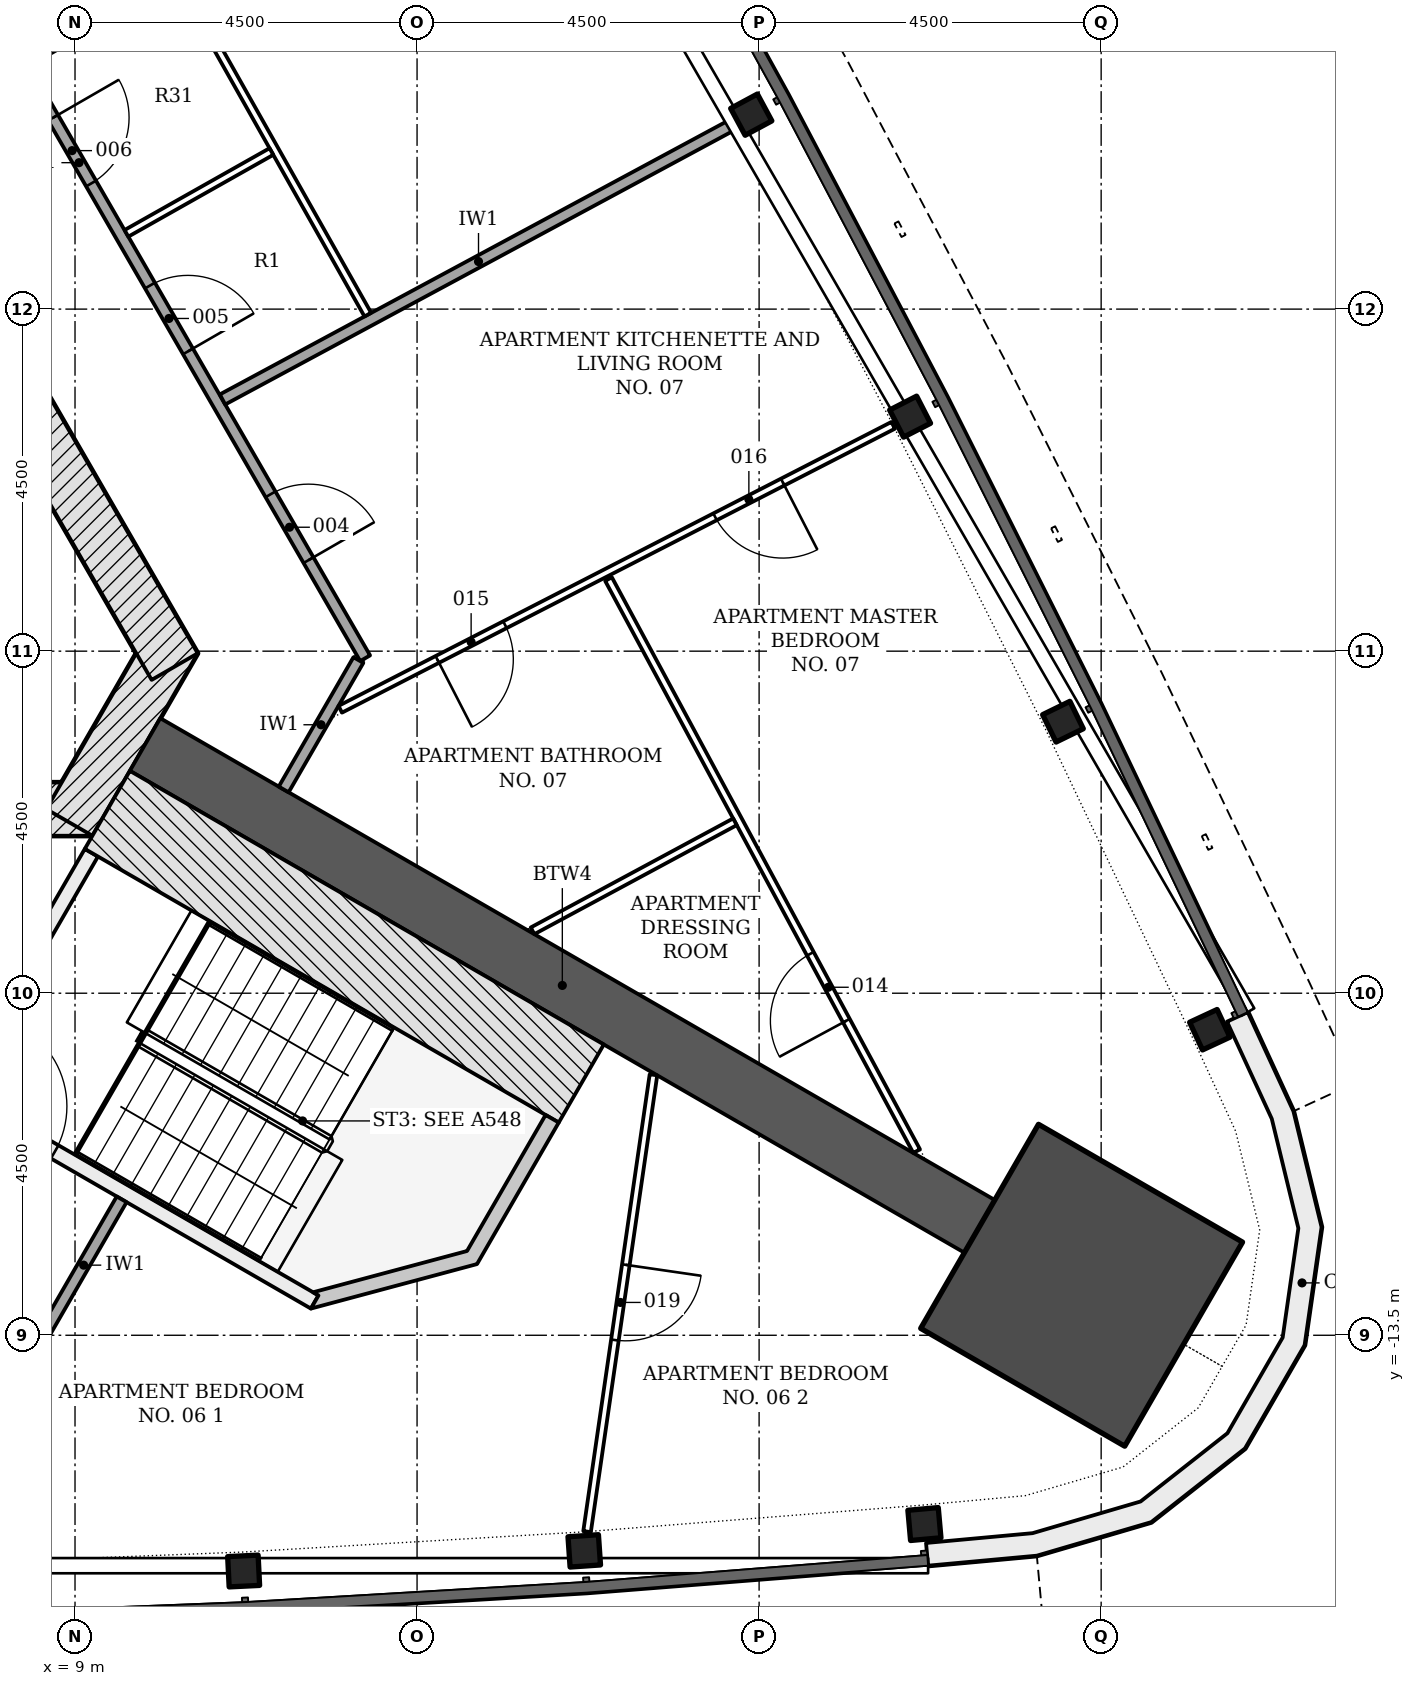
"""IFC4 building model, lengths in metres.
Left out: names, types, materials, properties, quantities, classifications, styles, units other than length and angle.
Written with IfcOpenShell. Run it as: python <this file> out.ifc"""

import sys

from ifc_helpers import new_model, si_unit, direction, frame, frame_2d, origin, origin_2d, place, context, subcontext, project, spatial, polyline, rectangle, i_section, outline, extrude, element, fill, save


model = new_model("IFC4")
c1 = context("Model", 3, precision=1e-05, world=origin(), true_north=direction((0.0, 1.0)))
c2 = subcontext(c1, "Body", "Model", "MODEL_VIEW")
j1 = project(units=[si_unit("LENGTHUNIT", "METRE"), si_unit("PLANEANGLEUNIT", "RADIAN")], contexts=[c1])
p1 = place(None, origin())
s1 = spatial("IfcSite", under=j1, at=p1, CompositionType="ELEMENT")
p2 = place(p1, origin())
s2 = spatial("IfcBuilding", under=s1, at=p2, CompositionType="ELEMENT")
p3 = place(p2, frame((0.0, 0.0, 91.5)))
s3 = spatial("IfcBuildingStorey", under=s2, at=p3, CompositionType="ELEMENT", Elevation=91.5)
p4 = place(p3, frame((-9.229, -6.578, -0.2), z_axis=(0.0, 0.0, 1.0), x_axis=(1.0, 0.0, 0.0)))
e1 = element("IfcWall", 1, at=p4, inside=s3, PredefinedType="SHEAR", context=c2, shape_type="SweptSolid", body=[
    extrude(rectangle(XDim=18.458, YDim=0.7, at=frame_2d((9.229, 0.0))), origin(), (0.0, 0.0, 1.0), 3.6),
])
p5 = place(p4, frame((3.304, 0.0, 0.2)))
e2 = element("IfcOpeningElement", 2, at=p5, cuts=e1, PredefinedType="OPENING", context=c2, shape_type="SweptSolid", body=[
    extrude(rectangle(XDim=1.1, YDim=2.1, at=frame_2d((0.55, 1.05))), frame((0.0, 0.36, 0.0), z_axis=(0.0, -1.0, 0.0), x_axis=(1.0, 0.0, 0.0)), (0.0, 0.0, 1.0), 0.72),
])
p6 = place(p4, frame((5.454, 0.0, 0.2)))
e3 = element("IfcOpeningElement", 3, at=p6, cuts=e1, PredefinedType="OPENING", context=c2, shape_type="SweptSolid", body=[
    extrude(rectangle(XDim=1.1, YDim=2.1, at=frame_2d((0.55, 1.05))), frame((0.0, 0.36, 0.0), z_axis=(0.0, -1.0, 0.0), x_axis=(1.0, 0.0, 0.0)), (0.0, 0.0, 1.0), 0.72),
])
p7 = place(p4, frame((7.604, 0.0, 0.2)))
e4 = element("IfcOpeningElement", 4, at=p7, cuts=e1, PredefinedType="OPENING", context=c2, shape_type="SweptSolid", body=[
    extrude(rectangle(XDim=1.1, YDim=2.1, at=frame_2d((0.55, 1.05))), frame((0.0, 0.36, 0.0), z_axis=(0.0, -1.0, 0.0), x_axis=(1.0, 0.0, 0.0)), (0.0, 0.0, 1.0), 0.72),
])
p8 = place(p4, frame((9.754, 0.0, 0.2)))
e5 = element("IfcOpeningElement", 5, at=p8, cuts=e1, PredefinedType="OPENING", context=c2, shape_type="SweptSolid", body=[
    extrude(rectangle(XDim=1.1, YDim=2.1, at=frame_2d((0.55, 1.05))), frame((0.0, 0.36, 0.0), z_axis=(0.0, -1.0, 0.0), x_axis=(1.0, 0.0, 0.0)), (0.0, 0.0, 1.0), 0.72),
])
p9 = place(p4, frame((11.904, 0.0, 0.2)))
e6 = element("IfcOpeningElement", 6, at=p9, cuts=e1, PredefinedType="OPENING", context=c2, shape_type="SweptSolid", body=[
    extrude(rectangle(XDim=1.1, YDim=2.1, at=frame_2d((0.55, 1.05))), frame((0.0, 0.36, 0.0), z_axis=(0.0, -1.0, 0.0), x_axis=(1.0, 0.0, 0.0)), (0.0, 0.0, 1.0), 0.72),
])
p10 = place(p4, frame((14.054, 0.0, 0.2)))
e7 = element("IfcOpeningElement", 7, at=p10, cuts=e1, PredefinedType="OPENING", context=c2, shape_type="SweptSolid", body=[
    extrude(rectangle(XDim=1.1, YDim=2.1, at=frame_2d((0.55, 1.05))), frame((0.0, 0.36, 0.0), z_axis=(0.0, -1.0, 0.0), x_axis=(1.0, 0.0, 0.0)), (0.0, 0.0, 1.0), 0.72),
])
p11 = place(p4, frame((1.079, 0.0, 0.2)))
e8 = element("IfcOpeningElement", 8, at=p11, cuts=e1, PredefinedType="OPENING", context=c2, shape_type="SweptSolid", body=[
    extrude(rectangle(XDim=0.9, YDim=2.1, at=frame_2d((0.45, 1.05))), frame((0.0, 0.36, 0.0), z_axis=(0.0, -1.0, 0.0), x_axis=(1.0, 0.0, 0.0)), (0.0, 0.0, 1.0), 0.72),
])
p12 = place(p3, frame((8.926, -6.753, -0.2), z_axis=(0.0, 0.0, 1.0), x_axis=(0.500042739161, 0.866000726912, 0.0)))
e9 = element("IfcWall", 9, at=p12, inside=s3, PredefinedType="SHEAR", context=c2, shape_type="SweptSolid", body=[
    extrude(rectangle(XDim=2.771, YDim=0.7, at=frame_2d((1.386, 0.0))), origin(), (0.0, 0.0, 1.0), 3.6),
])
p13 = place(p3, frame((10.311, -4.703, -0.2), z_axis=(0.0, 0.0, 1.0), x_axis=(-0.500001446645, 0.866024568562, 0.0)))
e10 = element("IfcWall", 10, at=p13, inside=s3, PredefinedType="SHEAR", context=c2, shape_type="SweptSolid", body=[
    extrude(rectangle(XDim=18.458, YDim=0.7, at=frame_2d((9.229, 0.0))), origin(), (0.0, 0.0, 1.0), 3.6),
])
p14 = place(p13, frame((8.7, 0.0, 0.2)))
e11 = element("IfcOpeningElement", 11, at=p14, cuts=e10, PredefinedType="OPENING", context=c2, shape_type="SweptSolid", body=[
    extrude(rectangle(XDim=1.0, YDim=2.1, at=frame_2d((0.5, 1.05))), frame((0.0, 0.36, 0.0), z_axis=(0.0, -1.0, 0.0), x_axis=(1.0, 0.0, 0.0)), (0.0, 0.0, 1.0), 0.72),
])
p15 = place(p13, frame((3.99, 0.0, 0.2)))
e12 = element("IfcOpeningElement", 12, at=p15, cuts=e10, PredefinedType="OPENING", context=c2, shape_type="SweptSolid", body=[
    extrude(rectangle(XDim=0.9, YDim=2.1, at=frame_2d((0.45, 1.05))), frame((0.0, 0.36, 0.0), z_axis=(0.0, -1.0, 0.0), x_axis=(1.0, 0.0, 0.0)), (0.0, 0.0, 1.0), 0.72),
])
p16 = place(p13, frame((13.539, 0.0, 0.2)))
e13 = element("IfcOpeningElement", 13, at=p16, cuts=e10, PredefinedType="OPENING", context=c2, shape_type="SweptSolid", body=[
    extrude(rectangle(XDim=0.9, YDim=2.1, at=frame_2d((0.45, 1.05))), frame((0.0, 0.36, 0.0), z_axis=(0.0, -1.0, 0.0), x_axis=(1.0, 0.0, 0.0)), (0.0, 0.0, 1.0), 0.72),
])
p17 = place(p3, frame((9.922, -5.728, -0.2), z_axis=(0.0, 0.0, 1.0), x_axis=(0.866029086277, -0.499993621681, 0.0)))
e14 = element("IfcWall", 14, at=p17, inside=s3, PredefinedType="SHEAR", context=c2, shape_type="SweptSolid", body=[
    extrude(rectangle(XDim=12.677, YDim=0.8, at=frame_2d((6.339, 0.0))), origin(), (0.0, 0.0, 1.0), 3.6),
])
p18 = place(p3, frame((22.243, -12.842, -0.2), z_axis=(0.0, 0.0, 1.0), x_axis=(0.866025403784, -0.5, 0.0)))
e15 = element("IfcColumn", 15, at=p18, inside=s3, PredefinedType="COLUMN", context=c2, shape_type="SweptSolid", body=[
    extrude(rectangle(XDim=3.1, YDim=3.1, at=origin_2d()), origin(), (0.0, 0.0, 1.0), 3.6),
])
for number, where, z_axis, x_axis in (
    (16, (11.219, -16.601, -0.2), (0.0, 0.0, 1.0), (0.999, 0.049, 0.0)),
    (17, (15.7, -16.336, -0.2), (0.0, 0.0, 1.0), (0.998, 0.069, 0.0)),
    (18, (20.175, -15.983, -0.2), (0.0, 0.0, 1.0), (0.996, 0.088, 0.0)),
    (19, (23.929, -9.48, -0.2), (0.0, 0.0, 1.0), (-0.421, 0.907, 0.0)),
    (20, (21.998, -5.428, -0.2), (0.0, 0.0, 1.0), (-0.439, 0.898, 0.0)),
    (21, (19.986, -1.415, -0.2), (0.0, 0.0, 1.0), (-0.457, 0.89, 0.0)),
    (22, (17.897, 2.558, -0.2), (0.0, 0.0, 1.0), (-0.474, 0.88, 0.0)),
):
    element("IfcColumn", number, at=place(p3, frame(where, z_axis=z_axis, x_axis=x_axis)), inside=s3, PredefinedType="COLUMN", context=c2, shape_type="SweptSolid", body=[
        extrude(i_section(OverallWidth=0.401, OverallDepth=0.399, WebThickness=0.025, FlangeThickness=0.04, FilletRadius=0.015, at=origin_2d()), origin(), (0.0, 0.0, 1.0), 3.6),
    ])
p19 = place(p3, origin())
e23 = element("IfcWall", 23, at=p19, inside=s3, PredefinedType="NOTDEFINED", context=c2, shape_type="SweptSolid", body=[
    extrude(outline(polyline([(20.224, -16.531), (21.654, -16.4), (23.159, -15.958), (24.392, -14.989), (25.177, -13.63), (25.4, -12.077), (25.03, -10.553), (24.428, -9.249), (24.156, -9.374), (24.745, -10.652), (25.094, -12.092), (24.888, -13.53), (24.161, -14.789), (23.019, -15.687), (21.597, -16.104), (20.196, -16.232), (20.224, -16.531)])), origin(), (0.0, 0.0, 1.0), 3.3),
])
p20 = place(p3, frame((7.44, -10.226, -0.2), z_axis=(0.0, 0.0, 1.0), x_axis=(0.500022077904, 0.866012656725, 0.0)))
e24 = element("IfcWall", 24, at=p20, inside=s3, PredefinedType="SHEAR", context=c2, shape_type="SweptSolid", body=[
    extrude(rectangle(XDim=3.55, YDim=0.2, at=frame_2d((1.775, 0.0))), origin(), (0.0, 0.0, 1.0), 3.6),
])
p21 = place(p20, frame((1.175, 0.0, 0.2)))
e25 = element("IfcOpeningElement", 25, at=p21, cuts=e24, PredefinedType="OPENING", context=c2, shape_type="SweptSolid", body=[
    extrude(rectangle(XDim=1.2, YDim=2.1, at=frame_2d((0.6, 1.05))), frame((0.0, 0.11, 0.0), z_axis=(0.0, -1.0, 0.0), x_axis=(1.0, 0.0, 0.0)), (0.0, 0.0, 1.0), 0.22),
])
p22 = place(p3, frame((7.304, -10.262, -0.2), z_axis=(0.0, 0.0, 1.0), x_axis=(0.866026594901, -0.49999793692, 0.0)))
e26 = element("IfcWall", 26, at=p22, inside=s3, PredefinedType="SHEAR", context=c2, shape_type="SweptSolid", body=[
    extrude(rectangle(XDim=5.6, YDim=0.2, at=frame_2d((2.8, 0.0))), origin(), (0.0, 0.0, 1.0), 3.6),
])
p23 = place(p22, frame((0.45, 0.0, 0.2)))
e27 = element("IfcOpeningElement", 27, at=p23, cuts=e26, PredefinedType="OPENING", context=c2, shape_type="SweptSolid", body=[
    extrude(rectangle(XDim=1.2, YDim=2.1, at=frame_2d((0.6, 1.05))), frame((0.0, 0.11, 0.0), z_axis=(0.0, -1.0, 0.0), x_axis=(1.0, 0.0, 0.0)), (0.0, 0.0, 1.0), 0.22),
])
p24 = place(p3, frame((9.425, -6.588, -0.2), z_axis=(0.0, 0.0, 1.0), x_axis=(0.866018442252, -0.500012057535, 0.0)))
e28 = element("IfcWall", 28, at=p24, inside=s3, PredefinedType="SHEAR", context=c2, shape_type="SweptSolid", body=[
    extrude(rectangle(XDim=7.2, YDim=1.186, at=frame_2d((3.6, 0.0))), origin(), (0.0, 0.0, 1.0), 3.6),
])
p25 = place(p3, frame((0.0, 0.0, -0.2)))
e29 = element("IfcWall", 29, at=p25, inside=s3, PredefinedType="SHEAR", context=c2, shape_type="SweptSolid", body=[
    extrude(outline(polyline([(12.104, -13.149), (14.289, -12.563), (15.364, -10.701), (15.191, -10.601), (14.157, -12.392), (12.132, -12.934), (12.204, -12.976), (12.204, -12.976), (12.204, -12.976), (12.204, -12.976), (12.204, -12.976), (12.204, -12.976), (12.204, -12.976), (12.204, -12.976), (12.204, -12.976), (12.204, -12.976), (12.204, -12.976), (12.204, -12.976), (12.204, -12.976), (12.204, -12.976), (12.204, -12.976), (12.204, -12.976), (12.204, -12.976), (12.104, -13.149)])), origin(), (0.0, 0.0, 1.0), 3.6),
])
p26 = place(p3, frame((5.289, 8.446, 0.0), z_axis=(0.0, 0.0, 1.0), x_axis=(0.499996620721, -0.866027354803, 0.0)))
e30 = element("IfcWall", 30, at=p26, inside=s3, PredefinedType="PARTITIONING", context=c2, shape_type="SweptSolid", body=[
    extrude(rectangle(XDim=15.057, YDim=0.15, at=frame_2d((7.528, 0.0))), origin(), (0.0, 0.0, 1.0), 2.778),
])
p27 = place(p26, frame((12.566, 0.0, 0.0)))
e31 = element("IfcOpeningElement", 31, at=p27, cuts=e30, PredefinedType="OPENING", context=c2, shape_type="SweptSolid", body=[
    extrude(rectangle(XDim=1.0, YDim=2.1, at=frame_2d((0.5, 1.05))), frame((0.0, 0.085, 0.0), z_axis=(0.0, -1.0, 0.0), x_axis=(1.0, 0.0, 0.0)), (0.0, 0.0, 1.0), 0.17),
])
p28 = place(p26, frame((9.395, 0.0, 0.0)))
e32 = element("IfcOpeningElement", 32, at=p28, cuts=e30, PredefinedType="OPENING", context=c2, shape_type="SweptSolid", body=[
    extrude(rectangle(XDim=1.0, YDim=2.1, at=frame_2d((0.5, 1.05))), frame((0.0, 0.085, 0.0), z_axis=(0.0, -1.0, 0.0), x_axis=(1.0, 0.0, 0.0)), (0.0, 0.0, 1.0), 0.17),
])
p29 = place(p26, frame((6.845, 0.0, 0.0)))
e33 = element("IfcOpeningElement", 33, at=p29, cuts=e30, PredefinedType="OPENING", context=c2, shape_type="SweptSolid", body=[
    extrude(rectangle(XDim=1.0, YDim=2.1, at=frame_2d((0.5, 1.05))), frame((0.0, 0.085, 0.0), z_axis=(0.0, -1.0, 0.0), x_axis=(1.0, 0.0, 0.0)), (0.0, 0.0, 1.0), 0.17),
])
p30 = place(p26, frame((3.537, 0.0, 0.0)))
e34 = element("IfcOpeningElement", 34, at=p30, cuts=e30, PredefinedType="OPENING", context=c2, shape_type="SweptSolid", body=[
    extrude(rectangle(XDim=1.5, YDim=2.1, at=frame_2d((0.75, 1.05))), frame((0.0, 0.085, 0.0), z_axis=(0.0, -1.0, 0.0), x_axis=(1.0, 0.0, 0.0)), (0.0, 0.0, 1.0), 0.17),
])
p31 = place(p3, frame((8.614, -13.444, 0.0), z_axis=(0.0, 0.0, 1.0), x_axis=(0.499972520799, 0.866041268327, 0.0)))
e35 = element("IfcWall", 35, at=p31, inside=s3, PredefinedType="PARTITIONING", context=c2, shape_type="SweptSolid", body=[
    extrude(rectangle(XDim=2.0, YDim=0.15, at=frame_2d((1.0, 0.0))), origin(), (0.0, 0.0, 1.0), 3.4),
])
p32 = place(p3, frame((11.745, -6.319, 0.0), z_axis=(0.0, 0.0, 1.0), x_axis=(0.500012721296, 0.866018059016, 0.0)))
e36 = element("IfcWall", 36, at=p32, inside=s3, PredefinedType="PARTITIONING", context=c2, shape_type="SweptSolid", body=[
    extrude(rectangle(XDim=1.966, YDim=0.15, at=frame_2d((0.983, 0.0))), origin(), (0.0, 0.0, 1.0), 2.778),
])
p33 = place(p3, frame((17.677, 2.44, 0.0), z_axis=(0.0, 0.0, 1.0), x_axis=(-0.880400392736, -0.47423111293, 0.0)))
e37 = element("IfcWall", 37, at=p33, inside=s3, PredefinedType="PARTITIONING", context=c2, shape_type="SweptSolid", body=[
    extrude(rectangle(XDim=7.651, YDim=0.15, at=frame_2d((3.826, 0.0))), origin(), (0.0, 0.0, 1.0), 2.778),
])
p34 = place(p3, frame((20.073, -11.078, 0.0), z_axis=(0.0, 0.0, 1.0), x_axis=(-0.474207115322, 0.880413318719, 0.0)))
e38 = element("IfcWall", 38, at=p34, inside=s3, PredefinedType="PARTITIONING", context=c2, shape_type="SweptSolid", body=[
    extrude(rectangle(XDim=8.548, YDim=0.1, at=frame_2d((4.274, 0.0))), origin(), (0.0, 0.0, 1.0), 2.778),
])
p35 = place(p34, frame((1.949, 0.0, 0.0)))
e39 = element("IfcOpeningElement", 39, at=p35, cuts=e38, PredefinedType="OPENING", context=c2, shape_type="SweptSolid", body=[
    extrude(rectangle(XDim=1.0, YDim=2.1, at=frame_2d((0.5, 1.05))), frame((0.0, 0.06, 0.0), z_axis=(0.0, -1.0, 0.0), x_axis=(1.0, 0.0, 0.0)), (0.0, 0.0, 1.0), 0.12),
])
p36 = place(p3, frame((19.764, -1.529, 0.0), z_axis=(0.0, 0.0, 1.0), x_axis=(-0.889562755555, -0.456812985728, 0.0)))
e40 = element("IfcWall", 40, at=p36, inside=s3, PredefinedType="PARTITIONING", context=c2, shape_type="SweptSolid", body=[
    extrude(rectangle(XDim=8.177, YDim=0.1, at=frame_2d((4.089, 0.0))), origin(), (0.0, 0.0, 1.0), 2.778),
])
p37 = place(p36, frame((5.742, 0.0, 0.0)))
e41 = element("IfcOpeningElement", 41, at=p37, cuts=e40, PredefinedType="OPENING", context=c2, shape_type="SweptSolid", body=[
    extrude(rectangle(XDim=1.0, YDim=2.1, at=frame_2d((0.5, 1.05))), frame((0.0, 0.06, 0.0), z_axis=(0.0, -1.0, 0.0), x_axis=(1.0, 0.0, 0.0)), (0.0, 0.0, 1.0), 0.12),
])
p38 = place(p36, frame((1.635, 0.0, 0.0)))
e42 = element("IfcOpeningElement", 42, at=p38, cuts=e40, PredefinedType="OPENING", context=c2, shape_type="SweptSolid", body=[
    extrude(rectangle(XDim=1.0, YDim=2.1, at=frame_2d((0.5, 1.05))), frame((0.0, 0.06, 0.0), z_axis=(0.0, -1.0, 0.0), x_axis=(1.0, 0.0, 0.0)), (0.0, 0.0, 1.0), 0.12),
])
p39 = place(p3, frame((16.61, -10.073, 0.0), z_axis=(0.0, 0.0, 1.0), x_axis=(-0.143841065588, -0.989600802269, 0.0)))
e43 = element("IfcWall", 43, at=p39, inside=s3, PredefinedType="PARTITIONING", context=c2, shape_type="SweptSolid", body=[
    extrude(rectangle(XDim=6.073, YDim=0.1, at=frame_2d((3.037, 0.0))), origin(), (0.0, 0.0, 1.0), 2.923),
])
p40 = place(p39, frame((2.526, 0.0, 0.0)))
e44 = element("IfcOpeningElement", 44, at=p40, cuts=e43, PredefinedType="OPENING", context=c2, shape_type="SweptSolid", body=[
    extrude(rectangle(XDim=1.0, YDim=2.1, at=frame_2d((0.5, 1.05))), frame((0.0, 0.06, 0.0), z_axis=(0.0, -1.0, 0.0), x_axis=(1.0, 0.0, 0.0)), (0.0, 0.0, 1.0), 0.12),
])
p41 = place(p3, frame((12.852, -0.073, 0.0), z_axis=(0.0, 0.0, 1.0), x_axis=(-0.491453614565, 0.870903751703, 0.0)))
e45 = element("IfcWall", 45, at=p41, inside=s3, PredefinedType="PARTITIONING", context=c2, shape_type="SweptSolid", body=[
    extrude(rectangle(XDim=5.092, YDim=0.1, at=frame_2d((2.546, 0.0))), origin(), (0.0, 0.0, 1.0), 2.778),
])
p42 = place(p3, frame((17.682, -6.745, 0.0), z_axis=(0.0, 0.0, 1.0), x_axis=(-0.880419251007, -0.474196101267, 0.0)))
e46 = element("IfcWall", 46, at=p42, inside=s3, PredefinedType="PARTITIONING", context=c2, shape_type="SweptSolid", body=[
    extrude(rectangle(XDim=3.024, YDim=0.1, at=frame_2d((1.512, 0.0))), origin(), (0.0, 0.0, 1.0), 3.4),
])
p43 = place(p3, frame((10.306, 4.337, 0.0), z_axis=(0.0, 0.0, 1.0), x_axis=(-0.870909527441, -0.491443379253, 0.0)))
e47 = element("IfcWall", 47, at=p43, inside=s3, PredefinedType="PARTITIONING", context=c2, shape_type="SweptSolid", body=[
    extrude(rectangle(XDim=2.215, YDim=0.1, at=frame_2d((1.107, 0.0))), origin(), (0.0, 0.0, 1.0), 3.4),
])
p44 = place(p3, frame((11.584, 2.073, 0.0), z_axis=(0.0, 0.0, 1.0), x_axis=(-0.870892816927, -0.491472991552, 0.0)))
e48 = element("IfcWall", 48, at=p44, inside=s3, PredefinedType="PARTITIONING", context=c2, shape_type="SweptSolid", body=[
    extrude(rectangle(XDim=2.19, YDim=0.1, at=frame_2d((1.095, 0.0))), origin(), (0.0, 0.0, 1.0), 3.4),
])
p45 = place(p23, origin())
e49 = element("IfcDoor", 49, at=p45, inside=s3, OperationType="SINGLE_SWING_LEFT", PredefinedType="DOOR", context=c2, shape_type="SweptSolid", body=[
    extrude(rectangle(XDim=1.2, YDim=2.1, at=frame_2d((0.6, 1.05))), frame((0.0, 0.025, 0.0), z_axis=(0.0, -1.0, 0.0), x_axis=(1.0, 0.0, 0.0)), (0.0, 0.0, 1.0), 0.05),
])
fill(e27, e49)
p46 = place(p27, origin())
e50 = element("IfcDoor", 50, at=p46, inside=s3, OperationType="SINGLE_SWING_RIGHT", PredefinedType="DOOR", context=c2, shape_type="SweptSolid", body=[
    extrude(rectangle(XDim=1.0, YDim=2.1, at=frame_2d((0.5, 1.05))), frame((0.0, 0.025, 0.0), z_axis=(0.0, -1.0, 0.0), x_axis=(1.0, 0.0, 0.0)), (0.0, 0.0, 1.0), 0.05),
])
fill(e31, e50)
p47 = place(p28, origin())
e51 = element("IfcDoor", 51, at=p47, inside=s3, OperationType="SINGLE_SWING_RIGHT", PredefinedType="DOOR", context=c2, shape_type="SweptSolid", body=[
    extrude(rectangle(XDim=1.0, YDim=2.1, at=frame_2d((0.5, 1.05))), frame((0.0, 0.025, 0.0), z_axis=(0.0, -1.0, 0.0), x_axis=(1.0, 0.0, 0.0)), (0.0, 0.0, 1.0), 0.05),
])
fill(e32, e51)
p48 = place(p29, origin())
e52 = element("IfcDoor", 52, at=p48, inside=s3, OperationType="SINGLE_SWING_LEFT", PredefinedType="DOOR", context=c2, shape_type="SweptSolid", body=[
    extrude(rectangle(XDim=1.0, YDim=2.1, at=frame_2d((0.5, 1.05))), frame((0.0, 0.025, 0.0), z_axis=(0.0, -1.0, 0.0), x_axis=(1.0, 0.0, 0.0)), (0.0, 0.0, 1.0), 0.05),
])
fill(e33, e52)
p49 = place(p35, origin())
e53 = element("IfcDoor", 53, at=p49, inside=s3, OperationType="SINGLE_SWING_LEFT", PredefinedType="DOOR", context=c2, shape_type="SweptSolid", body=[
    extrude(rectangle(XDim=1.0, YDim=2.1, at=frame_2d((0.5, 1.05))), frame((0.0, 0.025, 0.0), z_axis=(0.0, -1.0, 0.0), x_axis=(1.0, 0.0, 0.0)), (0.0, 0.0, 1.0), 0.05),
])
fill(e39, e53)
p50 = place(p37, origin())
e54 = element("IfcDoor", 54, at=p50, inside=s3, OperationType="SINGLE_SWING_RIGHT", PredefinedType="DOOR", context=c2, shape_type="SweptSolid", body=[
    extrude(rectangle(XDim=1.0, YDim=2.1, at=frame_2d((0.5, 1.05))), frame((0.0, 0.025, 0.0), z_axis=(0.0, -1.0, 0.0), x_axis=(1.0, 0.0, 0.0)), (0.0, 0.0, 1.0), 0.05),
])
fill(e41, e54)
p51 = place(p38, origin())
e55 = element("IfcDoor", 55, at=p51, inside=s3, OperationType="SINGLE_SWING_LEFT", PredefinedType="DOOR", context=c2, shape_type="SweptSolid", body=[
    extrude(rectangle(XDim=1.0, YDim=2.1, at=frame_2d((0.5, 1.05))), frame((0.0, 0.025, 0.0), z_axis=(0.0, -1.0, 0.0), x_axis=(1.0, 0.0, 0.0)), (0.0, 0.0, 1.0), 0.05),
])
fill(e42, e55)
p52 = place(p40, origin())
e56 = element("IfcDoor", 56, at=p52, inside=s3, OperationType="SINGLE_SWING_LEFT", PredefinedType="DOOR", context=c2, shape_type="SweptSolid", body=[
    extrude(rectangle(XDim=1.0, YDim=2.1, at=frame_2d((0.5, 1.05))), frame((0.0, 0.025, 0.0), z_axis=(0.0, -1.0, 0.0), x_axis=(1.0, 0.0, 0.0)), (0.0, 0.0, 1.0), 0.05),
])
fill(e44, e56)
save(model, sys.argv[1])
